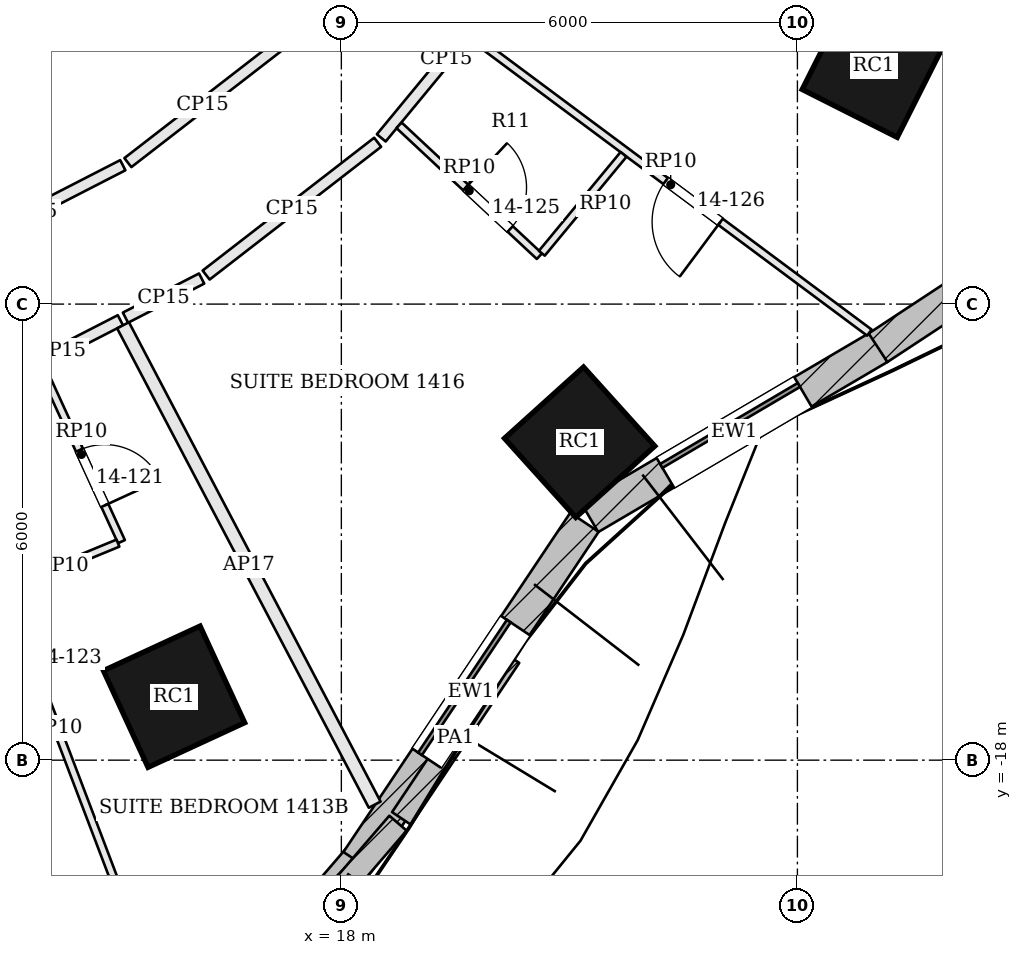
"""IFC4 building model, lengths in metres.
Left out: names, types, materials, properties, quantities, classifications, styles, units other than length and angle.
Written with IfcOpenShell. Run it as: python <this file> out.ifc"""

import sys

from ifc_helpers import new_model, si_unit, direction, frame, frame_2d, origin, origin_2d, place, context, subcontext, project, spatial, rectangle, extrude, element, fill, save


model = new_model("IFC4")
c1 = context("Model", 3, precision=1e-05, world=origin(), true_north=direction((0.0, 1.0)))
c2 = subcontext(c1, "Body", "Model", "MODEL_VIEW")
j1 = project(units=[si_unit("LENGTHUNIT", "METRE"), si_unit("PLANEANGLEUNIT", "RADIAN")], contexts=[c1])
p1 = place(None, origin())
s1 = spatial("IfcSite", under=j1, at=p1, CompositionType="ELEMENT")
p2 = place(p1, origin())
s2 = spatial("IfcBuilding", under=s1, at=p2, CompositionType="ELEMENT")
p3 = place(p2, frame((0.0, 0.0, 66.3)))
s3 = spatial("IfcBuildingStorey", under=s2, at=p3, CompositionType="ELEMENT", Elevation=66.3)
for number, where, z_axis, x_axis in (
    (1, (15.799, -17.165, 0.0), (0.0, 0.0, 1.0), (0.908, 0.419, 0.0)),
    (2, (21.135, -13.817, 0.0), (0.0, 0.0, 1.0), (0.743, 0.67, 0.0)),
    (3, (25.003, -8.866, 0.0), (0.0, 0.0, 1.0), (0.45, 0.893, 0.0)),
):
    element("IfcColumn", number, at=place(p3, frame(where, z_axis=z_axis, x_axis=x_axis)), inside=s3, PredefinedType="COLUMN", context=c2, shape_type="SweptSolid", body=[
        extrude(rectangle(XDim=1.4, YDim=1.4, at=origin_2d()), origin(), (0.0, 0.0, 1.0), 3.6),
    ])
p4 = place(p3, frame((15.919, -21.999, 0.0), z_axis=(0.0, 0.0, 1.0), x_axis=(0.652009971272, 0.758210391225, 0.0)))
e4 = element("IfcWall", 4, at=p4, inside=s3, PredefinedType="SOLIDWALL", context=c2, shape_type="SweptSolid", body=[
    extrude(rectangle(XDim=3.545, YDim=0.45, at=frame_2d((1.772, 0.0))), origin(), (0.0, 0.0, 1.0), 3.4),
])
p5 = place(p4, frame((0.722, 0.0, 0.9)))
e5 = element("IfcOpeningElement", 5, at=p5, cuts=e4, PredefinedType="OPENING", context=c2, shape_type="SweptSolid", body=[
    extrude(rectangle(XDim=2.1, YDim=2.0, at=frame_2d((1.05, 1.0))), frame((0.0, 0.235, 0.0), z_axis=(0.0, -1.0, 0.0), x_axis=(1.0, 0.0, 0.0)), (0.0, 0.0, 1.0), 0.47),
])
p6 = place(p3, frame((18.214, -19.333, 0.0), z_axis=(0.0, 0.0, 1.0), x_axis=(0.555833135316, 0.831293886471, 0.0)))
e6 = element("IfcWall", 6, at=p6, inside=s3, PredefinedType="SOLIDWALL", context=c2, shape_type="SweptSolid", body=[
    extrude(rectangle(XDim=5.368, YDim=0.45, at=frame_2d((2.684, 0.0))), origin(), (0.0, 0.0, 1.0), 3.4),
])
p7 = place(p6, frame((1.634, 0.0, 0.9)))
e7 = element("IfcOpeningElement", 7, at=p7, cuts=e6, PredefinedType="OPENING", context=c2, shape_type="SweptSolid", body=[
    extrude(rectangle(XDim=2.1, YDim=2.0, at=frame_2d((1.05, 1.0))), frame((0.0, 0.235, 0.0), z_axis=(0.0, -1.0, 0.0), x_axis=(1.0, 0.0, 0.0)), (0.0, 0.0, 1.0), 0.47),
])
p8 = place(p3, frame((21.266, -14.805, 0.0), z_axis=(0.0, 0.0, 1.0), x_axis=(0.861975457737, 0.506950007653, 0.0)))
e8 = element("IfcWall", 8, at=p8, inside=s3, PredefinedType="SOLIDWALL", context=c2, shape_type="SweptSolid", body=[
    extrude(rectangle(XDim=4.413, YDim=0.45, at=frame_2d((2.207, 0.0))), origin(), (0.0, 0.0, 1.0), 3.4),
])
p9 = place(p8, frame((1.156, 0.0, 0.9)))
e9 = element("IfcOpeningElement", 9, at=p9, cuts=e8, PredefinedType="OPENING", context=c2, shape_type="SweptSolid", body=[
    extrude(rectangle(XDim=2.1, YDim=2.0, at=frame_2d((1.05, 1.0))), frame((0.0, 0.235, 0.0), z_axis=(0.0, -1.0, 0.0), x_axis=(1.0, 0.0, 0.0)), (0.0, 0.0, 1.0), 0.47),
])
p10 = place(p3, frame((25.061, -12.574, 0.0), z_axis=(0.0, 0.0, 1.0), x_axis=(0.83520622102, 0.549936876714, 0.0)))
e10 = element("IfcWall", 10, at=p10, inside=s3, PredefinedType="SOLIDWALL", context=c2, shape_type="SweptSolid", body=[
    extrude(rectangle(XDim=5.57, YDim=0.45, at=frame_2d((2.785, 0.0))), origin(), (0.0, 0.0, 1.0), 3.4),
])
p11 = place(p10, frame((1.735, 0.0, 0.9)))
e11 = element("IfcOpeningElement", 11, at=p11, cuts=e10, PredefinedType="OPENING", context=c2, shape_type="SweptSolid", body=[
    extrude(rectangle(XDim=2.1, YDim=2.0, at=frame_2d((1.05, 1.0))), frame((0.0, 0.235, 0.0), z_axis=(0.0, -1.0, 0.0), x_axis=(1.0, 0.0, 0.0)), (0.0, 0.0, 1.0), 0.47),
])
p12 = place(p3, frame((18.076, -19.492, 0.0), z_axis=(0.0, 0.0, 1.0), x_axis=(0.822618823872, -0.568593238274, 0.0)))
e12 = element("IfcWall", 12, at=p12, inside=s3, PredefinedType="SOLIDWALL", context=c2, shape_type="SweptSolid", body=[
    extrude(rectangle(XDim=1.75, YDim=0.2, at=frame_2d((0.875, 0.0))), origin(), (0.0, 0.0, 1.0), 3.4),
])
p13 = place(p3, frame((16.056, -21.956, 3.6), z_axis=(0.0, 0.0, 1.0), x_axis=(0.652038588201, 0.75818578165, 0.0)))
e13 = element("IfcWall", 13, at=p13, inside=s3, PredefinedType="PARAPET", context=c2, shape_type="SweptSolid", body=[
    extrude(rectangle(XDim=4.124, YDim=0.3, at=frame_2d((2.062, 0.0))), origin(), (0.0, 0.0, 1.0), 1.1),
])
p14 = place(p3, frame((18.792, -18.767, 3.6), z_axis=(0.0, 0.0, 1.0), x_axis=(0.555843382853, 0.831287034507, 0.0)))
e14 = element("IfcWall", 14, at=p14, inside=s3, PredefinedType="PARAPET", context=c2, shape_type="SweptSolid", body=[
    extrude(rectangle(XDim=2.562, YDim=0.3, at=frame_2d((1.281, 0.0))), origin(), (0.0, 0.0, 1.0), 1.1),
])
p15 = place(p3, frame((13.501, -13.03, 0.0), z_axis=(0.0, 0.0, 1.0), x_axis=(0.88960147572, 0.456737577168, 0.0)))
e15 = element("IfcWall", 15, at=p15, inside=s3, PredefinedType="PARTITIONING", context=c2, shape_type="SweptSolid", body=[
    extrude(rectangle(XDim=1.79, YDim=0.15, at=frame_2d((0.895, 0.0))), origin(), (0.0, 0.0, 1.0), 2.68),
])
p16 = place(p3, frame((18.439, -18.586, 0.0), z_axis=(0.0, 0.0, 1.0), x_axis=(-0.464812403085, 0.885409187855, 0.0)))
e16 = element("IfcWall", 16, at=p16, inside=s3, PredefinedType="PARTITIONING", context=c2, shape_type="SweptSolid", body=[
    extrude(rectangle(XDim=7.123, YDim=0.175, at=frame_2d((3.562, 0.0))), origin(), (0.0, 0.0, 1.0), 2.68),
])
p17 = place(p3, frame((15.16, -12.178, 0.0), z_axis=(0.0, 0.0, 1.0), x_axis=(0.889562255844, 0.456813958826, 0.0)))
e17 = element("IfcWall", 17, at=p17, inside=s3, PredefinedType="PARTITIONING", context=c2, shape_type="SweptSolid", body=[
    extrude(rectangle(XDim=1.126, YDim=0.15, at=frame_2d((0.563, 0.0))), origin(), (0.0, 0.0, 1.0), 2.68),
])
p18 = place(p3, frame((16.221, -11.618, 0.0), z_axis=(0.0, 0.0, 1.0), x_axis=(0.79075977513, 0.612126602948, 0.0)))
e18 = element("IfcWall", 18, at=p18, inside=s3, PredefinedType="PARTITIONING", context=c2, shape_type="SweptSolid", body=[
    extrude(rectangle(XDim=2.854, YDim=0.15, at=frame_2d((1.427, 0.0))), origin(), (0.0, 0.0, 1.0), 2.68),
])
p19 = place(p3, frame((18.525, -9.813, 0.0), z_axis=(0.0, 0.0, 1.0), x_axis=(0.636590727548, 0.771201818981, 0.0)))
e19 = element("IfcWall", 19, at=p19, inside=s3, PredefinedType="PARTITIONING", context=c2, shape_type="SweptSolid", body=[
    extrude(rectangle(XDim=2.691, YDim=0.15, at=frame_2d((1.346, 0.0))), origin(), (0.0, 0.0, 1.0), 2.68),
])
p20 = place(p3, frame((17.158, -8.616, 0.0), z_axis=(0.0, 0.0, 1.0), x_axis=(-0.790740570998, -0.612151410501, 0.0)))
e20 = element("IfcWall", 20, at=p20, inside=s3, PredefinedType="PARTITIONING", context=c2, shape_type="SweptSolid", body=[
    extrude(rectangle(XDim=2.487, YDim=0.15, at=frame_2d((1.243, 0.0))), origin(), (0.0, 0.0, 1.0), 2.68),
])
p21 = place(p3, frame((15.125, -10.173, 0.0), z_axis=(0.0, 0.0, 1.0), x_axis=(-0.889567018144, -0.456804684993, 0.0)))
e21 = element("IfcWall", 21, at=p21, inside=s3, PredefinedType="PARTITIONING", context=c2, shape_type="SweptSolid", body=[
    extrude(rectangle(XDim=2.691, YDim=0.15, at=frame_2d((1.345, 0.0))), origin(), (0.0, 0.0, 1.0), 2.68),
])
p22 = place(p3, frame((15.837, -21.743, 0.0), z_axis=(0.0, 0.0, 1.0), x_axis=(-0.355314828952, 0.934746688856, 0.0)))
e22 = element("IfcWall", 22, at=p22, inside=s3, PredefinedType="PARTITIONING", context=c2, shape_type="SweptSolid", body=[
    extrude(rectangle(XDim=8.923, YDim=0.1, at=frame_2d((4.461, 0.0))), origin(), (0.0, 0.0, 1.0), 2.68),
])
p23 = place(p22, frame((5.0, 0.0, 0.0)))
e23 = element("IfcOpeningElement", 23, at=p23, cuts=e22, PredefinedType="OPENING", context=c2, shape_type="SweptSolid", body=[
    extrude(rectangle(XDim=0.9, YDim=2.4, at=frame_2d((0.45, 1.2))), frame((0.0, 0.06, 0.0), z_axis=(0.0, -1.0, 0.0), x_axis=(1.0, 0.0, 0.0)), (0.0, 0.0, 1.0), 0.12),
])
p24 = place(p3, frame((14.054, -12.83, 0.0), z_axis=(0.0, 0.0, 1.0), x_axis=(0.416714635196, -0.909037355015, 0.0)))
e24 = element("IfcWall", 24, at=p24, inside=s3, PredefinedType="PARTITIONING", context=c2, shape_type="SweptSolid", body=[
    extrude(rectangle(XDim=2.525, YDim=0.1, at=frame_2d((1.263, 0.0))), origin(), (0.0, 0.0, 1.0), 2.68),
])
p25 = place(p24, frame((1.2, 0.0, 0.0)))
e25 = element("IfcOpeningElement", 25, at=p25, cuts=e24, PredefinedType="OPENING", context=c2, shape_type="SweptSolid", body=[
    extrude(rectangle(XDim=0.8, YDim=2.1, at=frame_2d((0.4, 1.05))), frame((0.0, 0.06, 0.0), z_axis=(0.0, -1.0, 0.0), x_axis=(1.0, 0.0, 0.0)), (0.0, 0.0, 1.0), 0.12),
])
p26 = place(p3, frame((15.061, -15.145, 0.0), z_axis=(0.0, 0.0, 1.0), x_axis=(-0.924177864306, -0.381962400147, 0.0)))
e26 = element("IfcWall", 26, at=p26, inside=s3, PredefinedType="PARTITIONING", context=c2, shape_type="SweptSolid", body=[
    extrude(rectangle(XDim=1.569, YDim=0.1, at=frame_2d((0.785, 0.0))), origin(), (0.0, 0.0, 1.0), 2.68),
])
p27 = place(p3, frame((24.946, -12.375, 0.0), z_axis=(0.0, 0.0, 1.0), x_axis=(-0.802211102923, 0.597040489705, 0.0)))
e27 = element("IfcWall", 27, at=p27, inside=s3, PredefinedType="PARTITIONING", context=c2, shape_type="SweptSolid", body=[
    extrude(rectangle(XDim=6.516, YDim=0.1, at=frame_2d((3.258, 0.0))), origin(), (0.0, 0.0, 1.0), 2.68),
])
p28 = place(p27, frame((2.441, 0.0, 0.0)))
e28 = element("IfcOpeningElement", 28, at=p28, cuts=e27, PredefinedType="OPENING", context=c2, shape_type="SweptSolid", body=[
    extrude(rectangle(XDim=0.9, YDim=2.4, at=frame_2d((0.45, 1.2))), frame((0.0, 0.06, 0.0), z_axis=(0.0, -1.0, 0.0), x_axis=(1.0, 0.0, 0.0)), (0.0, 0.0, 1.0), 0.12),
])
p29 = place(p3, frame((18.759, -9.648, 0.0), z_axis=(0.0, 0.0, 1.0), x_axis=(0.731331715945, -0.682021936049, 0.0)))
e29 = element("IfcWall", 29, at=p29, inside=s3, PredefinedType="PARTITIONING", context=c2, shape_type="SweptSolid", body=[
    extrude(rectangle(XDim=2.525, YDim=0.1, at=frame_2d((1.263, 0.0))), origin(), (0.0, 0.0, 1.0), 2.68),
])
p30 = place(p29, frame((1.2, 0.0, 0.0)))
e30 = element("IfcOpeningElement", 30, at=p30, cuts=e29, PredefinedType="OPENING", context=c2, shape_type="SweptSolid", body=[
    extrude(rectangle(XDim=0.8, YDim=2.1, at=frame_2d((0.4, 1.05))), frame((0.0, 0.06, 0.0), z_axis=(0.0, -1.0, 0.0), x_axis=(1.0, 0.0, 0.0)), (0.0, 0.0, 1.0), 0.12),
])
p31 = place(p3, frame((20.637, -11.331, 0.0), z_axis=(0.0, 0.0, 1.0), x_axis=(0.637105732439, 0.770776417447, 0.0)))
e31 = element("IfcWall", 31, at=p31, inside=s3, PredefinedType="PARTITIONING", context=c2, shape_type="SweptSolid", body=[
    extrude(rectangle(XDim=1.688, YDim=0.1, at=frame_2d((0.844, 0.0))), origin(), (0.0, 0.0, 1.0), 2.68),
])
p32 = place(p7, origin())
e32 = element("IfcWindow", 32, at=p32, inside=s3, PartitioningType="SINGLE_PANEL", PredefinedType="WINDOW", context=c2, shape_type="SweptSolid", body=[
    extrude(rectangle(XDim=2.1, YDim=2.0, at=frame_2d((1.05, 1.0))), frame((0.0, 0.135, 0.0), z_axis=(0.0, -1.0, 0.0), x_axis=(1.0, 0.0, 0.0)), (0.0, 0.0, 1.0), 0.06),
])
fill(e7, e32)
p33 = place(p9, origin())
e33 = element("IfcWindow", 33, at=p33, inside=s3, PartitioningType="SINGLE_PANEL", PredefinedType="WINDOW", context=c2, shape_type="SweptSolid", body=[
    extrude(rectangle(XDim=2.1, YDim=2.0, at=frame_2d((1.05, 1.0))), frame((0.0, 0.135, 0.0), z_axis=(0.0, -1.0, 0.0), x_axis=(1.0, 0.0, 0.0)), (0.0, 0.0, 1.0), 0.06),
])
fill(e9, e33)
p34 = place(p25, origin())
e34 = element("IfcDoor", 34, at=p34, inside=s3, OperationType="SINGLE_SWING_RIGHT", PredefinedType="DOOR", context=c2, shape_type="SweptSolid", body=[
    extrude(rectangle(XDim=0.8, YDim=2.1, at=frame_2d((0.4, 1.05))), frame((0.0, 0.025, 0.0), z_axis=(0.0, -1.0, 0.0), x_axis=(1.0, 0.0, 0.0)), (0.0, 0.0, 1.0), 0.05),
])
fill(e25, e34)
p35 = place(p30, origin())
e35 = element("IfcDoor", 35, at=p35, inside=s3, OperationType="SINGLE_SWING_LEFT", PredefinedType="DOOR", context=c2, shape_type="SweptSolid", body=[
    extrude(rectangle(XDim=0.8, YDim=2.1, at=frame_2d((0.4, 1.05))), frame((0.0, 0.025, 0.0), z_axis=(0.0, -1.0, 0.0), x_axis=(1.0, 0.0, 0.0)), (0.0, 0.0, 1.0), 0.05),
])
fill(e30, e35)
p36 = place(p28, origin())
e36 = element("IfcDoor", 36, at=p36, inside=s3, OperationType="SINGLE_SWING_LEFT", PredefinedType="DOOR", context=c2, shape_type="SweptSolid", body=[
    extrude(rectangle(XDim=0.9, YDim=2.4, at=frame_2d((0.45, 1.2))), frame((0.0, 0.025, 0.0), z_axis=(0.0, -1.0, 0.0), x_axis=(1.0, 0.0, 0.0)), (0.0, 0.0, 1.0), 0.05),
])
fill(e28, e36)
save(model, sys.argv[1])
